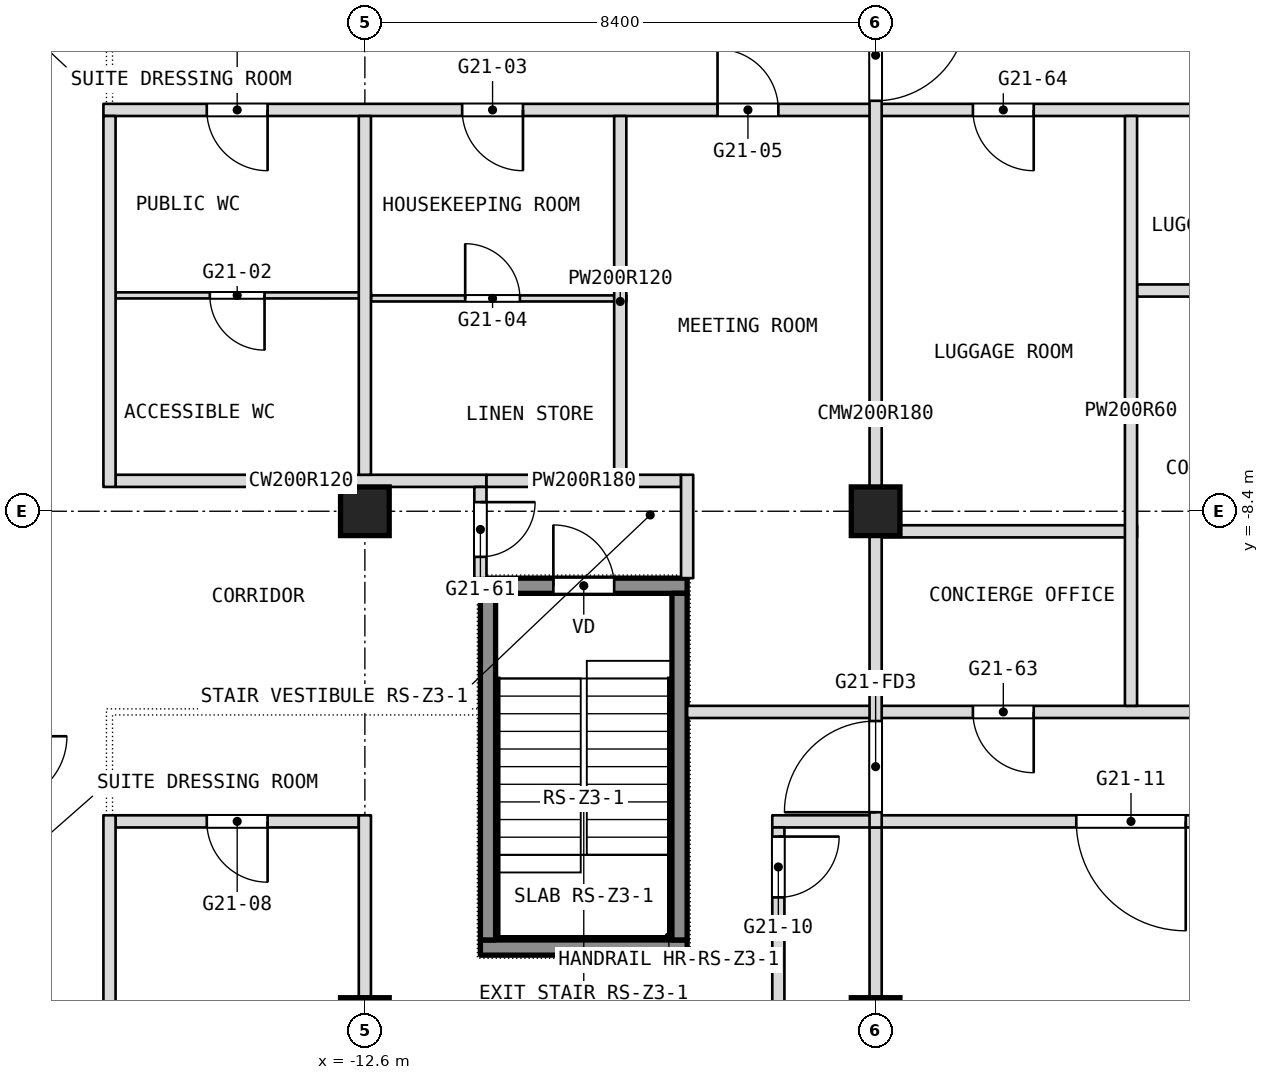
"""IFC4 building model, lengths in metres.
Left out: names, types, materials, properties, quantities, classifications, styles, units other than length and angle.
Written with IfcOpenShell. Run it as: python <this file> out.ifc"""

import sys

from ifc_helpers import new_model, si_unit, direction, frame, frame_2d, origin, origin_2d, place, context, subcontext, project, spatial, rectangle, extrude, element, fill, save


model = new_model("IFC4")
c1 = context("Model", 3, precision=1e-05, world=origin(), true_north=direction((0.0, 1.0)))
c2 = subcontext(c1, "Body", "Model", "MODEL_VIEW")
j1 = project(units=[si_unit("LENGTHUNIT", "METRE"), si_unit("PLANEANGLEUNIT", "RADIAN")], contexts=[c1])
p1 = place(None, origin())
s1 = spatial("IfcSite", under=j1, at=p1, CompositionType="ELEMENT")
p2 = place(p1, origin())
s2 = spatial("IfcBuilding", under=s1, at=p2, CompositionType="ELEMENT")
p3 = place(p2, frame((0.0, 0.0, 241.7)))
s3 = spatial("IfcBuildingStorey", under=s2, at=p3, CompositionType="ELEMENT", Elevation=241.7)
for number, where, z_axis, x_axis in (
    (1, (-12.6, -16.8, 0.0), (0.0, 0.0, 1.0), (1.0, 0.0, 0.0)),
    (2, (-12.6, -8.4, 0.0), (0.0, 0.0, 1.0), (1.0, 0.0, 0.0)),
    (3, (-4.2, -16.8, 0.0), (0.0, 0.0, 1.0), (1.0, 0.0, 0.0)),
    (4, (-4.2, -8.4, 0.0), (0.0, 0.0, 1.0), (1.0, 0.0, 0.0)),
):
    element("IfcColumn", number, at=place(p3, frame(where, z_axis=z_axis, x_axis=x_axis)), inside=s3, PredefinedType="COLUMN", context=c2, shape_type="SweptSolid", body=[
        extrude(rectangle(XDim=0.8, YDim=0.8, at=origin_2d()), origin(), (0.0, 0.0, 1.0), 3.6),
    ])
p4 = place(p3, frame((-16.7, -13.5, 0.0), z_axis=(0.0, 0.0, 1.0), x_axis=(1.0, 0.0, 0.0)))
e5 = element("IfcWall", 5, at=p4, inside=s3, PredefinedType="PARTITIONING", context=c2, shape_type="SweptSolid", body=[
    extrude(rectangle(XDim=4.0, YDim=0.2, at=frame_2d((2.0, 0.0))), origin(), (0.0, 0.0, 1.0), 3.34),
])
p5 = place(p4, frame((1.5, 0.0, 0.0)))
e6 = element("IfcOpeningElement", 6, at=p5, cuts=e5, PredefinedType="OPENING", context=c2, shape_type="SweptSolid", body=[
    extrude(rectangle(XDim=1.0, YDim=2.1, at=frame_2d((0.5, 1.05))), frame((0.0, 0.1, 0.0), z_axis=(0.0, -1.0, 0.0), x_axis=(1.0, 0.0, 0.0)), (0.0, 0.0, 1.0), 0.2),
])
p6 = place(p3, frame((-5.9, -13.5, 0.0), z_axis=(0.0, 0.0, 1.0), x_axis=(1.0, 0.0, 0.0)))
e7 = element("IfcWall", 7, at=p6, inside=s3, PredefinedType="PARTITIONING", context=c2, shape_type="SweptSolid", body=[
    extrude(rectangle(XDim=11.6, YDim=0.2, at=frame_2d((5.8, 0.0))), origin(), (0.0, 0.0, 1.0), 3.34),
])
p7 = place(p6, frame((5.0, 0.0, 0.0)))
e8 = element("IfcOpeningElement", 8, at=p7, cuts=e7, PredefinedType="OPENING", context=c2, shape_type="SweptSolid", body=[
    extrude(rectangle(XDim=1.8, YDim=2.1, at=frame_2d((0.9, 1.05))), frame((0.0, 0.1, 0.0), z_axis=(0.0, -1.0, 0.0), x_axis=(1.0, 0.0, 0.0)), (0.0, 0.0, 1.0), 0.2),
])
p8 = place(p3, frame((-7.3, -11.7, 0.0), z_axis=(0.0, 0.0, 1.0), x_axis=(1.0, 0.0, 0.0)))
e9 = element("IfcWall", 9, at=p8, inside=s3, PredefinedType="PARTITIONING", context=c2, shape_type="SweptSolid", body=[
    extrude(rectangle(XDim=14.6, YDim=0.2, at=frame_2d((7.3, 0.0))), origin(), (0.0, 0.0, 1.0), 3.34),
])
p9 = place(p8, frame((4.7, 0.0, 0.0)))
e10 = element("IfcOpeningElement", 10, at=p9, cuts=e9, PredefinedType="OPENING", context=c2, shape_type="SweptSolid", body=[
    extrude(rectangle(XDim=1.0, YDim=2.1, at=frame_2d((0.5, 1.05))), frame((0.0, 0.1, 0.0), z_axis=(0.0, -1.0, 0.0), x_axis=(1.0, 0.0, 0.0)), (0.0, 0.0, 1.0), 0.2),
])
p10 = place(p8, frame((8.9, 0.0, 0.0)))
e11 = element("IfcOpeningElement", 11, at=p10, cuts=e9, PredefinedType="OPENING", context=c2, shape_type="SweptSolid", body=[
    extrude(rectangle(XDim=1.0, YDim=2.1, at=frame_2d((0.5, 1.05))), frame((0.0, 0.1, 0.0), z_axis=(0.0, -1.0, 0.0), x_axis=(1.0, 0.0, 0.0)), (0.0, 0.0, 1.0), 0.2),
])
p11 = place(p3, frame((-4.1, -8.73, 0.0), z_axis=(0.0, 0.0, 1.0), x_axis=(1.0, 0.0, 0.0)))
e12 = element("IfcWall", 12, at=p11, inside=s3, PredefinedType="PARTITIONING", context=c2, shape_type="SweptSolid", body=[
    extrude(rectangle(XDim=4.2, YDim=0.2, at=frame_2d((2.1, 0.0))), origin(), (0.0, 0.0, 1.0), 3.34),
])
p12 = place(p3, frame((-16.7, -7.9, 0.0), z_axis=(0.0, 0.0, 1.0), x_axis=(1.0, 0.0, 0.0)))
e13 = element("IfcWall", 13, at=p12, inside=s3, PredefinedType="PARTITIONING", context=c2, shape_type="SweptSolid", body=[
    extrude(rectangle(XDim=6.1, YDim=0.2, at=frame_2d((3.05, 0.0))), origin(), (0.0, 0.0, 1.0), 3.34),
])
p13 = place(p3, frame((-10.6, -7.9, 0.0), z_axis=(0.0, 0.0, 1.0), x_axis=(1.0, 0.0, 0.0)))
e14 = element("IfcWall", 14, at=p13, inside=s3, PredefinedType="PARTITIONING", context=c2, shape_type="SweptSolid", body=[
    extrude(rectangle(XDim=3.2, YDim=0.2, at=frame_2d((1.6, 0.0))), origin(), (0.0, 0.0, 1.0), 3.34),
])
p14 = place(p3, frame((-12.5, -4.9, 0.0), z_axis=(0.0, 0.0, 1.0), x_axis=(1.0, 0.0, 0.0)))
e15 = element("IfcWall", 15, at=p14, inside=s3, PredefinedType="PARTITIONING", context=c2, shape_type="SweptSolid", body=[
    extrude(rectangle(XDim=4.2, YDim=0.1, at=frame_2d((2.1, 0.0))), origin(), (0.0, 0.0, 1.0), 3.34),
])
p15 = place(p14, frame((1.55, 0.0, 0.0)))
e16 = element("IfcOpeningElement", 16, at=p15, cuts=e15, PredefinedType="OPENING", context=c2, shape_type="SweptSolid", body=[
    extrude(rectangle(XDim=0.9, YDim=2.1, at=frame_2d((0.45, 1.05))), frame((0.0, 0.05, 0.0), z_axis=(0.0, -1.0, 0.0), x_axis=(1.0, 0.0, 0.0)), (0.0, 0.0, 1.0), 0.1),
])
p16 = place(p3, frame((-16.7, -4.85, 0.0), z_axis=(0.0, 0.0, 1.0), x_axis=(1.0, 0.0, 0.0)))
e17 = element("IfcWall", 17, at=p16, inside=s3, PredefinedType="PARTITIONING", context=c2, shape_type="SweptSolid", body=[
    extrude(rectangle(XDim=4.2, YDim=0.1, at=frame_2d((2.1, 0.0))), origin(), (0.0, 0.0, 1.0), 3.34),
])
p17 = place(p16, frame((1.55, 0.0, 0.0)))
e18 = element("IfcOpeningElement", 18, at=p17, cuts=e17, PredefinedType="OPENING", context=c2, shape_type="SweptSolid", body=[
    extrude(rectangle(XDim=0.9, YDim=2.1, at=frame_2d((0.45, 1.05))), frame((0.0, 0.05, 0.0), z_axis=(0.0, -1.0, 0.0), x_axis=(1.0, 0.0, 0.0)), (0.0, 0.0, 1.0), 0.1),
])
p18 = place(p3, frame((0.1, -4.77, 0.0), z_axis=(0.0, 0.0, 1.0), x_axis=(1.0, 0.0, 0.0)))
e19 = element("IfcWall", 19, at=p18, inside=s3, PredefinedType="PARTITIONING", context=c2, shape_type="SweptSolid", body=[
    extrude(rectangle(XDim=4.0, YDim=0.2, at=frame_2d((2.0, 0.0))), origin(), (0.0, 0.0, 1.0), 3.34),
])
p19 = place(p3, frame((-16.9, -1.8, 0.0), z_axis=(0.0, 0.0, 1.0), x_axis=(1.0, 0.0, 0.0)))
e20 = element("IfcWall", 20, at=p19, inside=s3, PredefinedType="PARTITIONING", context=c2, shape_type="SweptSolid", body=[
    extrude(rectangle(XDim=33.8, YDim=0.2, at=frame_2d((16.9, 0.0))), origin(), (0.0, 0.0, 1.0), 3.34),
])
p20 = place(p19, frame((1.7, 0.0, 0.0)))
e21 = element("IfcOpeningElement", 21, at=p20, cuts=e20, PredefinedType="OPENING", context=c2, shape_type="SweptSolid", body=[
    extrude(rectangle(XDim=1.0, YDim=2.1, at=frame_2d((0.5, 1.05))), frame((0.0, 0.1, 0.0), z_axis=(0.0, -1.0, 0.0), x_axis=(1.0, 0.0, 0.0)), (0.0, 0.0, 1.0), 0.2),
])
p21 = place(p19, frame((5.9, 0.0, 0.0)))
e22 = element("IfcOpeningElement", 22, at=p21, cuts=e20, PredefinedType="OPENING", context=c2, shape_type="SweptSolid", body=[
    extrude(rectangle(XDim=1.0, YDim=2.1, at=frame_2d((0.5, 1.05))), frame((0.0, 0.1, 0.0), z_axis=(0.0, -1.0, 0.0), x_axis=(1.0, 0.0, 0.0)), (0.0, 0.0, 1.0), 0.2),
])
p22 = place(p19, frame((10.1, 0.0, 0.0)))
e23 = element("IfcOpeningElement", 23, at=p22, cuts=e20, PredefinedType="OPENING", context=c2, shape_type="SweptSolid", body=[
    extrude(rectangle(XDim=1.0, YDim=2.1, at=frame_2d((0.5, 1.05))), frame((0.0, 0.1, 0.0), z_axis=(0.0, -1.0, 0.0), x_axis=(1.0, 0.0, 0.0)), (0.0, 0.0, 1.0), 0.2),
])
p23 = place(p19, frame((24.4, 0.0, 0.0)))
e24 = element("IfcOpeningElement", 24, at=p23, cuts=e20, PredefinedType="OPENING", context=c2, shape_type="SweptSolid", body=[
    extrude(rectangle(XDim=1.8, YDim=2.1, at=frame_2d((0.9, 1.05))), frame((0.0, 0.1, 0.0), z_axis=(0.0, -1.0, 0.0), x_axis=(1.0, 0.0, 0.0)), (0.0, 0.0, 1.0), 0.2),
])
p24 = place(p19, frame((31.1, 0.0, 0.0)))
e25 = element("IfcOpeningElement", 25, at=p24, cuts=e20, PredefinedType="OPENING", context=c2, shape_type="SweptSolid", body=[
    extrude(rectangle(XDim=1.0, YDim=2.1, at=frame_2d((0.5, 1.05))), frame((0.0, 0.1, 0.0), z_axis=(0.0, -1.0, 0.0), x_axis=(1.0, 0.0, 0.0)), (0.0, 0.0, 1.0), 0.2),
])
p25 = place(p19, frame((14.3, 0.0, 0.0)))
e26 = element("IfcOpeningElement", 26, at=p25, cuts=e20, PredefinedType="OPENING", context=c2, shape_type="SweptSolid", body=[
    extrude(rectangle(XDim=1.0, YDim=2.1, at=frame_2d((0.5, 1.05))), frame((0.0, 0.1, 0.0), z_axis=(0.0, -1.0, 0.0), x_axis=(1.0, 0.0, 0.0)), (0.0, 0.0, 1.0), 0.2),
])
p26 = place(p19, frame((18.5, 0.0, 0.0)))
e27 = element("IfcOpeningElement", 27, at=p26, cuts=e20, PredefinedType="OPENING", context=c2, shape_type="SweptSolid", body=[
    extrude(rectangle(XDim=1.0, YDim=2.1, at=frame_2d((0.5, 1.05))), frame((0.0, 0.1, 0.0), z_axis=(0.0, -1.0, 0.0), x_axis=(1.0, 0.0, 0.0)), (0.0, 0.0, 1.0), 0.2),
])
p27 = place(p3, frame((0.0, -11.6, 0.0), z_axis=(0.0, 0.0, 1.0), x_axis=(0.0, 1.0, 0.0)))
e28 = element("IfcWall", 28, at=p27, inside=s3, PredefinedType="PARTITIONING", context=c2, shape_type="SweptSolid", body=[
    extrude(rectangle(XDim=9.7, YDim=0.2, at=frame_2d((4.85, 0.0))), origin(), (0.0, 0.0, 1.0), 3.34),
])
p28 = place(p3, frame((-4.2, -22.0, 0.0), z_axis=(0.0, 0.0, 1.0), x_axis=(0.0, 1.0, 0.0)))
e29 = element("IfcWall", 29, at=p28, inside=s3, PredefinedType="PARTITIONING", context=c2, shape_type="SweptSolid", body=[
    extrude(rectangle(XDim=8.4, YDim=0.2, at=frame_2d((4.2, 0.0))), origin(), (0.0, 0.0, 1.0), 3.34),
])
p29 = place(p28, frame((0.25, 0.0, 0.0)))
e30 = element("IfcOpeningElement", 30, at=p29, cuts=e29, PredefinedType="OPENING", context=c2, shape_type="SweptSolid", body=[
    extrude(rectangle(XDim=1.5, YDim=2.1, at=frame_2d((0.75, 1.05))), frame((0.0, 0.1, 0.0), z_axis=(0.0, -1.0, 0.0), x_axis=(1.0, 0.0, 0.0)), (0.0, 0.0, 1.0), 0.2),
])
p30 = place(p3, frame((-4.2, -13.6, 0.0), z_axis=(0.0, 0.0, 1.0), x_axis=(0.0, 1.0, 0.0)))
e31 = element("IfcWall", 31, at=p30, inside=s3, PredefinedType="PARTITIONING", context=c2, shape_type="SweptSolid", body=[
    extrude(rectangle(XDim=13.6, YDim=0.2, at=frame_2d((6.8, 0.0))), origin(), (0.0, 0.0, 1.0), 3.34),
])
p31 = place(p30, frame((11.95, 0.0, 0.0)))
e32 = element("IfcOpeningElement", 32, at=p31, cuts=e31, PredefinedType="OPENING", context=c2, shape_type="SweptSolid", body=[
    extrude(rectangle(XDim=1.5, YDim=2.1, at=frame_2d((0.75, 1.05))), frame((0.0, 0.1, 0.0), z_axis=(0.0, -1.0, 0.0), x_axis=(1.0, 0.0, 0.0)), (0.0, 0.0, 1.0), 0.2),
])
p32 = place(p30, frame((0.25, 0.0, 0.0)))
e33 = element("IfcOpeningElement", 33, at=p32, cuts=e31, PredefinedType="OPENING", context=c2, shape_type="SweptSolid", body=[
    extrude(rectangle(XDim=1.5, YDim=2.1, at=frame_2d((0.75, 1.05))), frame((0.0, 0.1, 0.0), z_axis=(0.0, -1.0, 0.0), x_axis=(1.0, 0.0, 0.0)), (0.0, 0.0, 1.0), 0.2),
])
p33 = place(p3, frame((-5.8, -18.5, 0.0), z_axis=(0.0, 0.0, 1.0), x_axis=(0.0, 1.0, 0.0)))
e34 = element("IfcWall", 34, at=p33, inside=s3, PredefinedType="PARTITIONING", context=c2, shape_type="SweptSolid", body=[
    extrude(rectangle(XDim=4.9, YDim=0.2, at=frame_2d((2.45, 0.0))), origin(), (0.0, 0.0, 1.0), 3.34),
])
p34 = place(p33, frame((3.75, 0.0, 0.0)))
e35 = element("IfcOpeningElement", 35, at=p34, cuts=e34, PredefinedType="OPENING", context=c2, shape_type="SweptSolid", body=[
    extrude(rectangle(XDim=1.0, YDim=2.1, at=frame_2d((0.5, 1.05))), frame((0.0, 0.1, 0.0), z_axis=(0.0, -1.0, 0.0), x_axis=(1.0, 0.0, 0.0)), (0.0, 0.0, 1.0), 0.2),
])
p35 = place(p3, frame((-7.3, -9.5, 0.0), z_axis=(0.0, 0.0, 1.0), x_axis=(0.0, 1.0, 0.0)))
e36 = element("IfcWall", 36, at=p35, inside=s3, PredefinedType="PARTITIONING", context=c2, shape_type="SweptSolid", body=[
    extrude(rectangle(XDim=1.7, YDim=0.2, at=frame_2d((0.85, 0.0))), origin(), (0.0, 0.0, 1.0), 3.34),
])
p36 = place(p3, frame((-8.4, -8.0, 0.0), z_axis=(0.0, 0.0, 1.0), x_axis=(0.0, 1.0, 0.0)))
e37 = element("IfcWall", 37, at=p36, inside=s3, PredefinedType="PARTITIONING", context=c2, shape_type="SweptSolid", body=[
    extrude(rectangle(XDim=6.1, YDim=0.2, at=frame_2d((3.05, 0.0))), origin(), (0.0, 0.0, 1.0), 3.34),
])
p37 = place(p3, frame((-10.7, -9.5, 0.0), z_axis=(0.0, 0.0, 1.0), x_axis=(0.0, 1.0, 0.0)))
e38 = element("IfcWall", 38, at=p37, inside=s3, PredefinedType="PARTITIONING", context=c2, shape_type="SweptSolid", body=[
    extrude(rectangle(XDim=1.5, YDim=0.2, at=frame_2d((0.75, 0.0))), origin(), (0.0, 0.0, 1.0), 3.34),
])
p38 = place(p37, frame((0.35, 0.0, 0.0)))
e39 = element("IfcOpeningElement", 39, at=p38, cuts=e38, PredefinedType="OPENING", context=c2, shape_type="SweptSolid", body=[
    extrude(rectangle(XDim=0.9, YDim=2.1, at=frame_2d((0.45, 1.05))), frame((0.0, 0.1, 0.0), z_axis=(0.0, -1.0, 0.0), x_axis=(1.0, 0.0, 0.0)), (0.0, 0.0, 1.0), 0.2),
])
p39 = place(p3, frame((-12.6, -7.8, 0.0), z_axis=(0.0, 0.0, 1.0), x_axis=(0.0, 1.0, 0.0)))
e40 = element("IfcWall", 40, at=p39, inside=s3, PredefinedType="PARTITIONING", context=c2, shape_type="SweptSolid", body=[
    extrude(rectangle(XDim=5.9, YDim=0.2, at=frame_2d((2.95, 0.0))), origin(), (0.0, 0.0, 1.0), 3.34),
])
p40 = place(p3, frame((-12.6, -18.5, 0.0), z_axis=(0.0, 0.0, 1.0), x_axis=(0.0, 1.0, 0.0)))
e41 = element("IfcWall", 41, at=p40, inside=s3, PredefinedType="PARTITIONING", context=c2, shape_type="SweptSolid", body=[
    extrude(rectangle(XDim=5.1, YDim=0.2, at=frame_2d((2.55, 0.0))), origin(), (0.0, 0.0, 1.0), 3.34),
])
p41 = place(p3, frame((-16.8, -20.2, 0.0), z_axis=(0.0, 0.0, 1.0), x_axis=(0.0, 1.0, 0.0)))
e42 = element("IfcWall", 42, at=p41, inside=s3, PredefinedType="PARTITIONING", context=c2, shape_type="SweptSolid", body=[
    extrude(rectangle(XDim=6.8, YDim=0.2, at=frame_2d((3.4, 0.0))), origin(), (0.0, 0.0, 1.0), 3.34),
])
p42 = place(p3, frame((-16.8, -8.0, 0.0), z_axis=(0.0, 0.0, 1.0), x_axis=(0.0, 1.0, 0.0)))
e43 = element("IfcWall", 43, at=p42, inside=s3, PredefinedType="PARTITIONING", context=c2, shape_type="SweptSolid", body=[
    extrude(rectangle(XDim=6.1, YDim=0.2, at=frame_2d((3.05, 0.0))), origin(), (0.0, 0.0, 1.0), 3.34),
])
p43 = place(p3, frame((-10.7, -15.575, 0.1), z_axis=(0.0, 0.0, 1.0), x_axis=(1.0, 0.0, 0.0)))
e44 = element("IfcWall", 44, at=p43, inside=s3, PredefinedType="SHEAR", context=c2, shape_type="SweptSolid", body=[
    extrude(rectangle(XDim=3.4, YDim=0.25, at=frame_2d((1.7, 0.0))), origin(), (0.0, 0.0, 1.0), 3.6),
])
p44 = place(p3, frame((-10.7, -9.625, 0.1), z_axis=(0.0, 0.0, 1.0), x_axis=(1.0, 0.0, 0.0)))
e45 = element("IfcWall", 45, at=p44, inside=s3, PredefinedType="SHEAR", context=c2, shape_type="SweptSolid", body=[
    extrude(rectangle(XDim=3.4, YDim=0.25, at=frame_2d((1.7, 0.0))), origin(), (0.0, 0.0, 1.0), 3.6),
])
p45 = place(p44, frame((1.2, 0.0, 0.0)))
e46 = element("IfcOpeningElement", 46, at=p45, cuts=e45, PredefinedType="OPENING", context=c2, shape_type="SweptSolid", body=[
    extrude(rectangle(XDim=1.0, YDim=2.1, at=frame_2d((0.5, 1.05))), frame((0.0, 0.125, 0.0), z_axis=(0.0, -1.0, 0.0), x_axis=(1.0, 0.0, 0.0)), (0.0, 0.0, 1.0), 0.25),
])
for number, where, z_axis, x_axis in (
    (47, (-10.575, -15.45, 0.1), (0.0, 0.0, 1.0), (0.0, 1.0, 0.0)),
    (48, (-7.425, -15.45, 0.1), (0.0, 0.0, 1.0), (0.0, 1.0, 0.0)),
):
    element("IfcWall", number, at=place(p3, frame(where, z_axis=z_axis, x_axis=x_axis)), inside=s3, PredefinedType="SHEAR", context=c2, shape_type="SweptSolid", body=[
        extrude(rectangle(XDim=5.7, YDim=0.25, at=frame_2d((2.85, 0.0))), origin(), (0.0, 0.0, 1.0), 3.6),
    ])
p46 = place(p5, origin())
e49 = element("IfcDoor", 49, at=p46, inside=s3, OperationType="SINGLE_SWING_RIGHT", PredefinedType="DOOR", context=c2, shape_type="SweptSolid", body=[
    extrude(rectangle(XDim=1.0, YDim=2.1, at=frame_2d((0.5, 1.05))), frame((0.0, 0.025, 0.0), z_axis=(0.0, -1.0, 0.0), x_axis=(1.0, 0.0, 0.0)), (0.0, 0.0, 1.0), 0.05),
])
fill(e6, e49)
p47 = place(p7, origin())
e50 = element("IfcDoor", 50, at=p47, inside=s3, OperationType="DOUBLE_DOOR_SINGLE_SWING", PredefinedType="DOOR", context=c2, shape_type="SweptSolid", body=[
    extrude(rectangle(XDim=1.8, YDim=2.1, at=frame_2d((0.9, 1.05))), frame((0.0, 0.025, 0.0), z_axis=(0.0, -1.0, 0.0), x_axis=(1.0, 0.0, 0.0)), (0.0, 0.0, 1.0), 0.05),
])
fill(e8, e50)
p48 = place(p9, origin())
e51 = element("IfcDoor", 51, at=p48, inside=s3, OperationType="SINGLE_SWING_LEFT", PredefinedType="DOOR", context=c2, shape_type="SweptSolid", body=[
    extrude(rectangle(XDim=1.0, YDim=2.1, at=frame_2d((0.5, 1.05))), frame((0.0, 0.025, 0.0), z_axis=(0.0, -1.0, 0.0), x_axis=(1.0, 0.0, 0.0)), (0.0, 0.0, 1.0), 0.05),
])
fill(e10, e51)
p49 = place(p15, origin())
e52 = element("IfcDoor", 52, at=p49, inside=s3, OperationType="SINGLE_SWING_RIGHT", PredefinedType="DOOR", context=c2, shape_type="SweptSolid", body=[
    extrude(rectangle(XDim=0.9, YDim=2.1, at=frame_2d((0.45, 1.05))), frame((0.0, 0.025, 0.0), z_axis=(0.0, -1.0, 0.0), x_axis=(1.0, 0.0, 0.0)), (0.0, 0.0, 1.0), 0.05),
])
fill(e16, e52)
p50 = place(p17, origin())
e53 = element("IfcDoor", 53, at=p50, inside=s3, OperationType="SINGLE_SWING_RIGHT", PredefinedType="DOOR", context=c2, shape_type="SweptSolid", body=[
    extrude(rectangle(XDim=0.9, YDim=2.1, at=frame_2d((0.45, 1.05))), frame((0.0, 0.025, 0.0), z_axis=(0.0, -1.0, 0.0), x_axis=(1.0, 0.0, 0.0)), (0.0, 0.0, 1.0), 0.05),
])
fill(e18, e53)
p51 = place(p20, origin())
e54 = element("IfcDoor", 54, at=p51, inside=s3, OperationType="SINGLE_SWING_LEFT", PredefinedType="DOOR", context=c2, shape_type="SweptSolid", body=[
    extrude(rectangle(XDim=1.0, YDim=2.1, at=frame_2d((0.5, 1.05))), frame((0.0, 0.025, 0.0), z_axis=(0.0, -1.0, 0.0), x_axis=(1.0, 0.0, 0.0)), (0.0, 0.0, 1.0), 0.05),
])
fill(e21, e54)
p52 = place(p21, origin())
e55 = element("IfcDoor", 55, at=p52, inside=s3, OperationType="SINGLE_SWING_LEFT", PredefinedType="DOOR", context=c2, shape_type="SweptSolid", body=[
    extrude(rectangle(XDim=1.0, YDim=2.1, at=frame_2d((0.5, 1.05))), frame((0.0, 0.025, 0.0), z_axis=(0.0, -1.0, 0.0), x_axis=(1.0, 0.0, 0.0)), (0.0, 0.0, 1.0), 0.05),
])
fill(e22, e55)
p53 = place(p22, origin())
e56 = element("IfcDoor", 56, at=p53, inside=s3, OperationType="SINGLE_SWING_RIGHT", PredefinedType="DOOR", context=c2, shape_type="SweptSolid", body=[
    extrude(rectangle(XDim=1.0, YDim=2.1, at=frame_2d((0.5, 1.05))), frame((0.0, 0.025, 0.0), z_axis=(0.0, -1.0, 0.0), x_axis=(1.0, 0.0, 0.0)), (0.0, 0.0, 1.0), 0.05),
])
fill(e23, e56)
p54 = place(p25, origin())
e57 = element("IfcDoor", 57, at=p54, inside=s3, OperationType="SINGLE_SWING_LEFT", PredefinedType="DOOR", context=c2, shape_type="SweptSolid", body=[
    extrude(rectangle(XDim=1.0, YDim=2.1, at=frame_2d((0.5, 1.05))), frame((0.0, 0.025, 0.0), z_axis=(0.0, -1.0, 0.0), x_axis=(1.0, 0.0, 0.0)), (0.0, 0.0, 1.0), 0.05),
])
fill(e26, e57)
p55 = place(p34, origin())
e58 = element("IfcDoor", 58, at=p55, inside=s3, OperationType="SINGLE_SWING_RIGHT", PredefinedType="DOOR", context=c2, shape_type="SweptSolid", body=[
    extrude(rectangle(XDim=1.0, YDim=2.1, at=frame_2d((0.5, 1.05))), frame((0.0, 0.025, 0.0), z_axis=(0.0, -1.0, 0.0), x_axis=(1.0, 0.0, 0.0)), (0.0, 0.0, 1.0), 0.05),
])
fill(e35, e58)
p56 = place(p38, origin())
e59 = element("IfcDoor", 59, at=p56, inside=s3, OperationType="SINGLE_SWING_LEFT", PredefinedType="DOOR", context=c2, shape_type="SweptSolid", body=[
    extrude(rectangle(XDim=0.9, YDim=2.1, at=frame_2d((0.45, 1.05))), frame((0.0, 0.025, 0.0), z_axis=(0.0, -1.0, 0.0), x_axis=(1.0, 0.0, 0.0)), (0.0, 0.0, 1.0), 0.05),
])
fill(e39, e59)
p57 = place(p45, origin())
e60 = element("IfcDoor", 60, at=p57, inside=s3, OperationType="SINGLE_SWING_LEFT", PredefinedType="DOOR", context=c2, shape_type="SweptSolid", body=[
    extrude(rectangle(XDim=1.0, YDim=2.1, at=frame_2d((0.5, 1.05))), frame((0.0, 0.025, 0.0), z_axis=(0.0, -1.0, 0.0), x_axis=(1.0, 0.0, 0.0)), (0.0, 0.0, 1.0), 0.05),
])
fill(e46, e60)
p58 = place(p31, origin())
e61 = element("IfcDoor", 61, at=p58, inside=s3, OperationType="DOUBLE_DOOR_DOUBLE_SWING", PredefinedType="DOOR", context=c2, shape_type="SweptSolid", body=[
    extrude(rectangle(XDim=1.5, YDim=2.1, at=frame_2d((0.75, 1.05))), frame((0.0, 0.025, 0.0), z_axis=(0.0, -1.0, 0.0), x_axis=(1.0, 0.0, 0.0)), (0.0, 0.0, 1.0), 0.05),
])
fill(e32, e61)
p59 = place(p32, origin())
e62 = element("IfcDoor", 62, at=p59, inside=s3, OperationType="DOUBLE_DOOR_DOUBLE_SWING", PredefinedType="DOOR", context=c2, shape_type="SweptSolid", body=[
    extrude(rectangle(XDim=1.5, YDim=2.1, at=frame_2d((0.75, 1.05))), frame((0.0, 0.025, 0.0), z_axis=(0.0, -1.0, 0.0), x_axis=(1.0, 0.0, 0.0)), (0.0, 0.0, 1.0), 0.05),
])
fill(e33, e62)
save(model, sys.argv[1])
